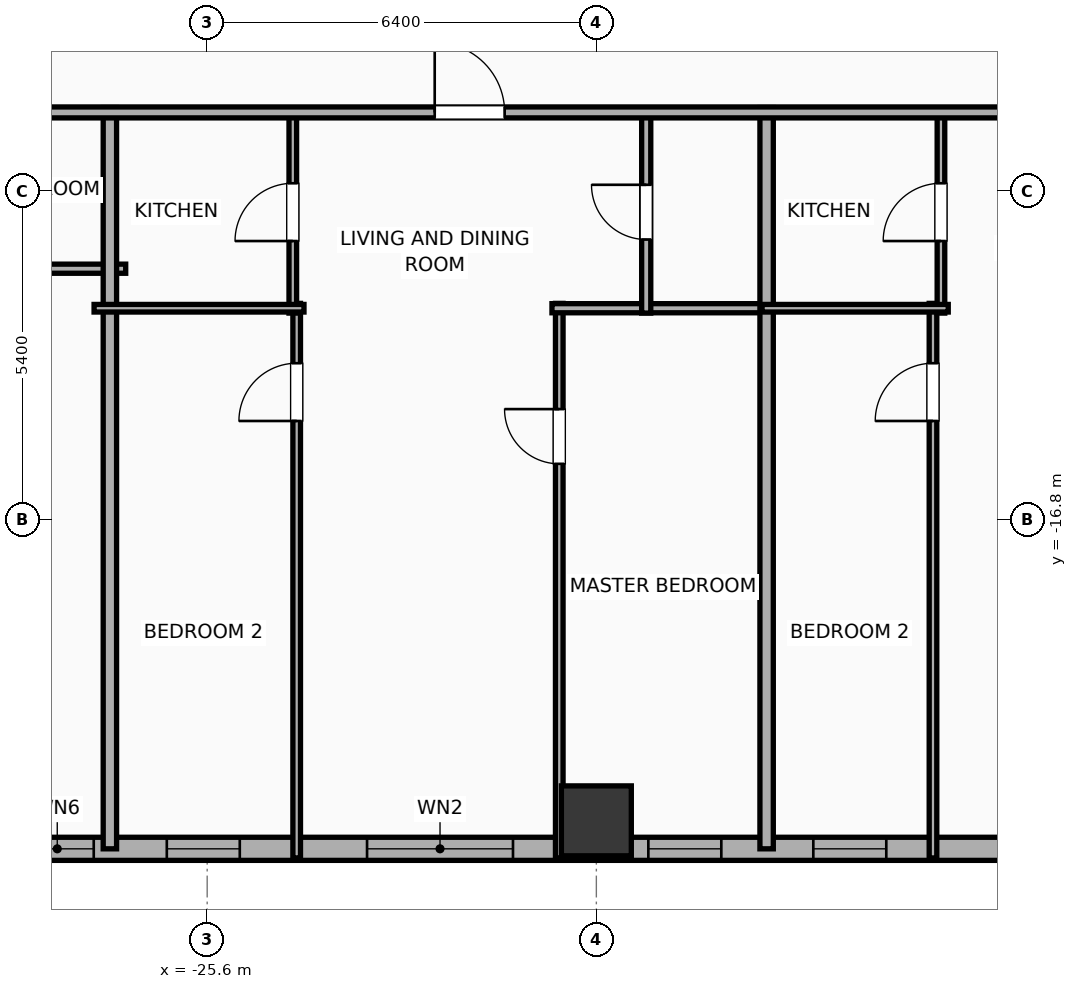
"""IFC4 building model, lengths in metres.
Left out: names, types, materials, properties, quantities, classifications, styles, units other than length and angle.
Written with IfcOpenShell. Run it as: python <this file> out.ifc"""

import sys

from ifc_helpers import new_model, si_unit, direction, frame, frame_2d, origin, origin_2d, place, context, subcontext, project, spatial, rectangle, hollow_rectangle, extrude, element, fill, save


model = new_model("IFC4")
c1 = context("Model", 3, precision=1e-05, world=origin(), true_north=direction((0.0, 1.0)))
c2 = subcontext(c1, "Body", "Model", "MODEL_VIEW")
j1 = project(units=[si_unit("LENGTHUNIT", "METRE"), si_unit("PLANEANGLEUNIT", "RADIAN")], contexts=[c1])
p1 = place(None, origin())
s1 = spatial("IfcSite", under=j1, at=p1, CompositionType="ELEMENT")
p2 = place(p1, origin())
s2 = spatial("IfcBuilding", under=s1, at=p2, CompositionType="ELEMENT")
p3 = place(p2, frame((0.0, 0.0, 37.7)))
s3 = spatial("IfcBuildingStorey", under=s2, at=p3, CompositionType="ELEMENT", Elevation=37.7)
p4 = place(p3, frame((-19.2, -21.75, 0.0), z_axis=(0.0, 0.0, 1.0), x_axis=(1.0, 0.0, 0.0)))
e1 = element("IfcColumn", 1, at=p4, inside=s3, PredefinedType="COLUMN", context=c2, shape_type="SweptSolid", body=[
    extrude(hollow_rectangle(XDim=1.15, YDim=1.15, WallThickness=0.04, at=origin_2d()), origin(), (0.0, 0.0, 1.0), 3.9),
])
p5 = place(p3, frame((22.381, -22.21, 0.0), z_axis=(0.0, 0.0, 1.0), x_axis=(-1.0, 0.0, 0.0)))
e2 = element("IfcWall", 2, at=p5, inside=s3, PredefinedType="ELEMENTEDWALL", context=c2, shape_type="SweptSolid", body=[
    extrude(rectangle(XDim=51.963, YDim=0.38, at=frame_2d((25.981, 0.0))), origin(), (0.0, 0.0, 1.0), 3.65),
])
p6 = place(p5, frame((42.952, 0.0, 0.75)))
e3 = element("IfcOpeningElement", 3, at=p6, cuts=e2, PredefinedType="OPENING", context=c2, shape_type="SweptSolid", body=[
    extrude(rectangle(XDim=2.4, YDim=2.1, at=frame_2d((1.2, 1.05))), frame((0.0, 0.2, 0.0), z_axis=(0.0, -1.0, 0.0), x_axis=(1.0, 0.0, 0.0)), (0.0, 0.0, 1.0), 0.4),
])
p7 = place(p5, frame((49.847, 0.0, 0.75)))
e4 = element("IfcOpeningElement", 4, at=p7, cuts=e2, PredefinedType="OPENING", context=c2, shape_type="SweptSolid", body=[
    extrude(rectangle(XDim=1.2, YDim=2.05, at=frame_2d((0.6, 1.025))), frame((0.0, 0.2, 0.0), z_axis=(0.0, -1.0, 0.0), x_axis=(1.0, 0.0, 0.0)), (0.0, 0.0, 1.0), 0.4),
])
p8 = place(p5, frame((47.445, 0.0, 0.75)))
e5 = element("IfcOpeningElement", 5, at=p8, cuts=e2, PredefinedType="OPENING", context=c2, shape_type="SweptSolid", body=[
    extrude(rectangle(XDim=1.2, YDim=2.05, at=frame_2d((0.6, 1.025))), frame((0.0, 0.2, 0.0), z_axis=(0.0, -1.0, 0.0), x_axis=(1.0, 0.0, 0.0)), (0.0, 0.0, 1.0), 0.4),
])
p9 = place(p5, frame((39.526, 0.0, 0.75)))
e6 = element("IfcOpeningElement", 6, at=p9, cuts=e2, PredefinedType="OPENING", context=c2, shape_type="SweptSolid", body=[
    extrude(rectangle(XDim=1.2, YDim=2.05, at=frame_2d((0.6, 1.025))), frame((0.0, 0.2, 0.0), z_axis=(0.0, -1.0, 0.0), x_axis=(1.0, 0.0, 0.0)), (0.0, 0.0, 1.0), 0.4),
])
p10 = place(p5, frame((33.018, 0.0, 0.75)))
e7 = element("IfcOpeningElement", 7, at=p10, cuts=e2, PredefinedType="OPENING", context=c2, shape_type="SweptSolid", body=[
    extrude(rectangle(XDim=1.2, YDim=2.05, at=frame_2d((0.6, 1.025))), frame((0.0, 0.2, 0.0), z_axis=(0.0, -1.0, 0.0), x_axis=(1.0, 0.0, 0.0)), (0.0, 0.0, 1.0), 0.4),
])
p11 = place(p5, frame((36.813, 0.0, 0.75)))
e8 = element("IfcOpeningElement", 8, at=p11, cuts=e2, PredefinedType="OPENING", context=c2, shape_type="SweptSolid", body=[
    extrude(rectangle(XDim=1.2, YDim=2.05, at=frame_2d((0.6, 1.025))), frame((0.0, 0.2, 0.0), z_axis=(0.0, -1.0, 0.0), x_axis=(1.0, 0.0, 0.0)), (0.0, 0.0, 1.0), 0.4),
])
p12 = place(p5, frame((28.886, 0.0, 0.75)))
e9 = element("IfcOpeningElement", 9, at=p12, cuts=e2, PredefinedType="OPENING", context=c2, shape_type="SweptSolid", body=[
    extrude(rectangle(XDim=1.2, YDim=2.05, at=frame_2d((0.6, 1.025))), frame((0.0, 0.2, 0.0), z_axis=(0.0, -1.0, 0.0), x_axis=(1.0, 0.0, 0.0)), (0.0, 0.0, 1.0), 0.4),
])
p13 = place(p5, frame((23.306, 0.0, 0.75)))
e10 = element("IfcOpeningElement", 10, at=p13, cuts=e2, PredefinedType="OPENING", context=c2, shape_type="SweptSolid", body=[
    extrude(rectangle(XDim=1.2, YDim=2.05, at=frame_2d((0.6, 1.025))), frame((0.0, 0.2, 0.0), z_axis=(0.0, -1.0, 0.0), x_axis=(1.0, 0.0, 0.0)), (0.0, 0.0, 1.0), 0.4),
])
p14 = place(p5, frame((26.056, 0.0, 0.75)))
e11 = element("IfcOpeningElement", 11, at=p14, cuts=e2, PredefinedType="OPENING", context=c2, shape_type="SweptSolid", body=[
    extrude(rectangle(XDim=1.2, YDim=2.05, at=frame_2d((0.6, 1.025))), frame((0.0, 0.2, 0.0), z_axis=(0.0, -1.0, 0.0), x_axis=(1.0, 0.0, 0.0)), (0.0, 0.0, 1.0), 0.4),
])
p15 = place(p5, frame((18.811, 0.0, 0.75)))
e12 = element("IfcOpeningElement", 12, at=p15, cuts=e2, PredefinedType="OPENING", context=c2, shape_type="SweptSolid", body=[
    extrude(rectangle(XDim=1.2, YDim=2.05, at=frame_2d((0.6, 1.025))), frame((0.0, 0.2, 0.0), z_axis=(0.0, -1.0, 0.0), x_axis=(1.0, 0.0, 0.0)), (0.0, 0.0, 1.0), 0.4),
])
p16 = place(p5, frame((14.602, 0.0, 0.75)))
e13 = element("IfcOpeningElement", 13, at=p16, cuts=e2, PredefinedType="OPENING", context=c2, shape_type="SweptSolid", body=[
    extrude(rectangle(XDim=1.2, YDim=2.05, at=frame_2d((0.6, 1.025))), frame((0.0, 0.2, 0.0), z_axis=(0.0, -1.0, 0.0), x_axis=(1.0, 0.0, 0.0)), (0.0, 0.0, 1.0), 0.4),
])
p17 = place(p5, frame((11.852, 0.0, 0.75)))
e14 = element("IfcOpeningElement", 14, at=p17, cuts=e2, PredefinedType="OPENING", context=c2, shape_type="SweptSolid", body=[
    extrude(rectangle(XDim=1.2, YDim=2.05, at=frame_2d((0.6, 1.025))), frame((0.0, 0.2, 0.0), z_axis=(0.0, -1.0, 0.0), x_axis=(1.0, 0.0, 0.0)), (0.0, 0.0, 1.0), 0.4),
])
p18 = place(p5, frame((8.316, 0.0, 0.75)))
e15 = element("IfcOpeningElement", 15, at=p18, cuts=e2, PredefinedType="OPENING", context=c2, shape_type="SweptSolid", body=[
    extrude(rectangle(XDim=1.2, YDim=2.05, at=frame_2d((0.6, 1.025))), frame((0.0, 0.2, 0.0), z_axis=(0.0, -1.0, 0.0), x_axis=(1.0, 0.0, 0.0)), (0.0, 0.0, 1.0), 0.4),
])
p19 = place(p5, frame((6.286, 0.0, 0.75)))
e16 = element("IfcOpeningElement", 16, at=p19, cuts=e2, PredefinedType="OPENING", context=c2, shape_type="SweptSolid", body=[
    extrude(rectangle(XDim=1.2, YDim=2.05, at=frame_2d((0.6, 1.025))), frame((0.0, 0.2, 0.0), z_axis=(0.0, -1.0, 0.0), x_axis=(1.0, 0.0, 0.0)), (0.0, 0.0, 1.0), 0.4),
])
p20 = place(p5, frame((3.737, 0.0, 0.75)))
e17 = element("IfcOpeningElement", 17, at=p20, cuts=e2, PredefinedType="OPENING", context=c2, shape_type="SweptSolid", body=[
    extrude(rectangle(XDim=1.2, YDim=2.05, at=frame_2d((0.6, 1.025))), frame((0.0, 0.2, 0.0), z_axis=(0.0, -1.0, 0.0), x_axis=(1.0, 0.0, 0.0)), (0.0, 0.0, 1.0), 0.4),
])
p21 = place(p5, frame((1.291, 0.0, 0.75)))
e18 = element("IfcOpeningElement", 18, at=p21, cuts=e2, PredefinedType="OPENING", context=c2, shape_type="SweptSolid", body=[
    extrude(rectangle(XDim=1.2, YDim=2.05, at=frame_2d((0.6, 1.025))), frame((0.0, 0.2, 0.0), z_axis=(0.0, -1.0, 0.0), x_axis=(1.0, 0.0, 0.0)), (0.0, 0.0, 1.0), 0.4),
])
p22 = place(p3, frame((-29.414, -12.67, 0.0), z_axis=(0.0, 0.0, 1.0), x_axis=(1.0, 0.0, 0.0)))
e19 = element("IfcWall", 19, at=p22, inside=s3, PredefinedType="PLUMBINGWALL", context=c2, shape_type="SweptSolid", body=[
    extrude(rectangle(XDim=2.474, YDim=0.15, at=frame_2d((1.237, 0.0))), origin(), (0.0, 0.0, 1.0), 3.65),
])
p23 = place(p3, frame((-27.2, -22.21, 0.0), z_axis=(0.0, 0.0, 1.0), x_axis=(0.0, 1.0, 0.0)))
e20 = element("IfcWall", 20, at=p23, inside=s3, PredefinedType="PARTITIONING", context=c2, shape_type="SweptSolid", body=[
    extrude(rectangle(XDim=12.19, YDim=0.22, at=frame_2d((6.095, 0.0))), origin(), (0.0, 0.0, 1.0), 3.65),
])
p24 = place(p3, frame((-24.128, -22.36, 0.0), z_axis=(0.0, 0.0, 1.0), x_axis=(0.0, 1.0, 0.0)))
e21 = element("IfcWall", 21, at=p24, inside=s3, PredefinedType="PARTITIONING", context=c2, shape_type="SweptSolid", body=[
    extrude(rectangle(XDim=9.12, YDim=0.125, at=frame_2d((4.56, 0.0))), origin(), (0.0, 0.0, 1.0), 3.65),
])
p25 = place(p24, frame((7.186, 0.0, 0.0)))
e22 = element("IfcOpeningElement", 22, at=p25, cuts=e21, PredefinedType="OPENING", context=c2, shape_type="SweptSolid", body=[
    extrude(rectangle(XDim=0.95, YDim=2.05, at=frame_2d((0.475, 1.025))), frame((0.0, 0.073, 0.0), z_axis=(0.0, -1.0, 0.0), x_axis=(1.0, 0.0, 0.0)), (0.0, 0.0, 1.0), 0.145),
])
p26 = place(p3, frame((-19.81, -22.36, 0.0), z_axis=(0.0, 0.0, 1.0), x_axis=(0.0, 1.0, 0.0)))
e23 = element("IfcWall", 23, at=p26, inside=s3, PredefinedType="PARTITIONING", context=c2, shape_type="SweptSolid", body=[
    extrude(rectangle(XDim=9.12, YDim=0.125, at=frame_2d((4.56, 0.0))), origin(), (0.0, 0.0, 1.0), 3.65),
])
p27 = place(p26, frame((6.481, 0.0, 0.0)))
e24 = element("IfcOpeningElement", 24, at=p27, cuts=e23, PredefinedType="OPENING", context=c2, shape_type="SweptSolid", body=[
    extrude(rectangle(XDim=0.9, YDim=2.05, at=frame_2d((0.45, 1.025))), frame((0.0, 0.073, 0.0), z_axis=(0.0, -1.0, 0.0), x_axis=(1.0, 0.0, 0.0)), (0.0, 0.0, 1.0), 0.145),
])
p28 = place(p3, frame((-19.93, -13.32, 0.0), z_axis=(0.0, 0.0, 1.0), x_axis=(1.0, 0.0, 0.0)))
e25 = element("IfcWall", 25, at=p28, inside=s3, PredefinedType="PLUMBINGWALL", context=c2, shape_type="SweptSolid", body=[
    extrude(rectangle(XDim=3.605, YDim=0.15, at=frame_2d((1.802, 0.0))), origin(), (0.0, 0.0, 1.0), 3.65),
])
p29 = place(p3, frame((-24.192, -13.4, 0.0), z_axis=(0.0, 0.0, 1.0), x_axis=(0.0, 1.0, 0.0)))
e26 = element("IfcWall", 26, at=p29, inside=s3, PredefinedType="PARTITIONING", context=c2, shape_type="SweptSolid", body=[
    extrude(rectangle(XDim=3.32, YDim=0.125, at=frame_2d((1.66, 0.0))), origin(), (0.0, 0.0, 1.0), 3.65),
])
p30 = place(p29, frame((1.185, 0.0, 0.0)))
e27 = element("IfcOpeningElement", 27, at=p30, cuts=e26, PredefinedType="OPENING", context=c2, shape_type="SweptSolid", body=[
    extrude(rectangle(XDim=0.95, YDim=2.05, at=frame_2d((0.475, 1.025))), frame((0.0, 0.073, 0.0), z_axis=(0.0, -1.0, 0.0), x_axis=(1.0, 0.0, 0.0)), (0.0, 0.0, 1.0), 0.145),
])
p31 = place(p3, frame((-27.46, -13.32, 0.0), z_axis=(0.0, 0.0, 1.0), x_axis=(1.0, 0.0, 0.0)))
e28 = element("IfcWall", 28, at=p31, inside=s3, PredefinedType="PARTITIONING", context=c2, shape_type="SweptSolid", body=[
    extrude(rectangle(XDim=3.452, YDim=0.125, at=frame_2d((1.726, 0.0))), origin(), (0.0, 0.0, 1.0), 3.65),
])
p32 = place(p3, frame((-18.38, -13.4, 0.0), z_axis=(0.0, 0.0, 1.0), x_axis=(0.0, 1.0, 0.0)))
e29 = element("IfcWall", 29, at=p32, inside=s3, PredefinedType="PLUMBINGWALL", context=c2, shape_type="SweptSolid", body=[
    extrude(rectangle(XDim=3.32, YDim=0.15, at=frame_2d((1.66, 0.0))), origin(), (0.0, 0.0, 1.0), 3.65),
])
p33 = place(p32, frame((1.21, 0.0, 0.0)))
e30 = element("IfcOpeningElement", 30, at=p33, cuts=e29, PredefinedType="OPENING", context=c2, shape_type="SweptSolid", body=[
    extrude(rectangle(XDim=0.9, YDim=2.05, at=frame_2d((0.45, 1.025))), frame((0.0, 0.085, 0.0), z_axis=(0.0, -1.0, 0.0), x_axis=(1.0, 0.0, 0.0)), (0.0, 0.0, 1.0), 0.17),
])
p34 = place(p3, frame((-16.4, -22.21, 0.0), z_axis=(0.0, 0.0, 1.0), x_axis=(0.0, 1.0, 0.0)))
e31 = element("IfcWall", 31, at=p34, inside=s3, PredefinedType="PARTITIONING", context=c2, shape_type="SweptSolid", body=[
    extrude(rectangle(XDim=12.19, YDim=0.22, at=frame_2d((6.095, 0.0))), origin(), (0.0, 0.0, 1.0), 3.65),
])
p35 = place(p3, frame((-13.664, -22.36, 0.0), z_axis=(0.0, 0.0, 1.0), x_axis=(0.0, 1.0, 0.0)))
e32 = element("IfcWall", 32, at=p35, inside=s3, PredefinedType="PARTITIONING", context=c2, shape_type="SweptSolid", body=[
    extrude(rectangle(XDim=9.12, YDim=0.125, at=frame_2d((4.56, 0.0))), origin(), (0.0, 0.0, 1.0), 3.65),
])
p36 = place(p35, frame((7.186, 0.0, 0.0)))
e33 = element("IfcOpeningElement", 33, at=p36, cuts=e32, PredefinedType="OPENING", context=c2, shape_type="SweptSolid", body=[
    extrude(rectangle(XDim=0.95, YDim=2.05, at=frame_2d((0.475, 1.025))), frame((0.0, 0.073, 0.0), z_axis=(0.0, -1.0, 0.0), x_axis=(1.0, 0.0, 0.0)), (0.0, 0.0, 1.0), 0.145),
])
p37 = place(p3, frame((-13.533, -13.4, 0.0), z_axis=(0.0, 0.0, 1.0), x_axis=(0.0, 1.0, 0.0)))
e34 = element("IfcWall", 34, at=p37, inside=s3, PredefinedType="PARTITIONING", context=c2, shape_type="SweptSolid", body=[
    extrude(rectangle(XDim=3.32, YDim=0.125, at=frame_2d((1.66, 0.0))), origin(), (0.0, 0.0, 1.0), 3.65),
])
p38 = place(p37, frame((1.185, 0.0, 0.0)))
e35 = element("IfcOpeningElement", 35, at=p38, cuts=e34, PredefinedType="OPENING", context=c2, shape_type="SweptSolid", body=[
    extrude(rectangle(XDim=0.95, YDim=2.05, at=frame_2d((0.475, 1.025))), frame((0.0, 0.073, 0.0), z_axis=(0.0, -1.0, 0.0), x_axis=(1.0, 0.0, 0.0)), (0.0, 0.0, 1.0), 0.145),
])
p39 = place(p3, frame((-16.475, -13.32, 0.0), z_axis=(0.0, 0.0, 1.0), x_axis=(1.0, 0.0, 0.0)))
e36 = element("IfcWall", 36, at=p39, inside=s3, PredefinedType="PARTITIONING", context=c2, shape_type="SweptSolid", body=[
    extrude(rectangle(XDim=3.062, YDim=0.125, at=frame_2d((1.531, 0.0))), origin(), (0.0, 0.0, 1.0), 3.65),
])
p40 = place(p3, frame((-33.41, -10.1, 0.0), z_axis=(0.0, 0.0, 1.0), x_axis=(1.0, 0.0, 0.0)))
e37 = element("IfcWall", 37, at=p40, inside=s3, PredefinedType="PARTITIONING", context=c2, shape_type="SweptSolid", body=[
    extrude(rectangle(XDim=59.62, YDim=0.18, at=frame_2d((29.81, 0.0))), origin(), (0.0, 0.0, 1.0), 3.65),
])
p41 = place(p40, frame((2.746, 0.0, 0.0)))
e38 = element("IfcOpeningElement", 38, at=p41, cuts=e37, PredefinedType="OPENING", context=c2, shape_type="SweptSolid", body=[
    extrude(rectangle(XDim=0.9, YDim=2.05, at=frame_2d((0.45, 1.025))), frame((0.0, 0.1, 0.0), z_axis=(0.0, -1.0, 0.0), x_axis=(1.0, 0.0, 0.0)), (0.0, 0.0, 1.0), 0.2),
])
p42 = place(p40, frame((11.552, 0.0, 0.0)))
e39 = element("IfcOpeningElement", 39, at=p42, cuts=e37, PredefinedType="OPENING", context=c2, shape_type="SweptSolid", body=[
    extrude(rectangle(XDim=1.15, YDim=2.05, at=frame_2d((0.575, 1.025))), frame((0.0, 0.1, 0.0), z_axis=(0.0, -1.0, 0.0), x_axis=(1.0, 0.0, 0.0)), (0.0, 0.0, 1.0), 0.2),
])
p43 = place(p40, frame((22.379, 0.0, 0.0)))
e40 = element("IfcOpeningElement", 40, at=p43, cuts=e37, PredefinedType="OPENING", context=c2, shape_type="SweptSolid", body=[
    extrude(rectangle(XDim=1.15, YDim=2.05, at=frame_2d((0.575, 1.025))), frame((0.0, 0.1, 0.0), z_axis=(0.0, -1.0, 0.0), x_axis=(1.0, 0.0, 0.0)), (0.0, 0.0, 1.0), 0.2),
])
p44 = place(p40, frame((31.28, 0.0, 0.0)))
e41 = element("IfcOpeningElement", 41, at=p44, cuts=e37, PredefinedType="OPENING", context=c2, shape_type="SweptSolid", body=[
    extrude(rectangle(XDim=1.15, YDim=2.05, at=frame_2d((0.575, 1.025))), frame((0.0, 0.1, 0.0), z_axis=(0.0, -1.0, 0.0), x_axis=(1.0, 0.0, 0.0)), (0.0, 0.0, 1.0), 0.2),
])
p45 = place(p40, frame((36.02, 0.0, 0.0)))
e42 = element("IfcOpeningElement", 42, at=p45, cuts=e37, PredefinedType="OPENING", context=c2, shape_type="SweptSolid", body=[
    extrude(rectangle(XDim=0.9, YDim=2.05, at=frame_2d((0.45, 1.025))), frame((0.0, 0.1, 0.0), z_axis=(0.0, -1.0, 0.0), x_axis=(1.0, 0.0, 0.0)), (0.0, 0.0, 1.0), 0.2),
])
p46 = place(p40, frame((40.044, 0.0, 0.0)))
e43 = element("IfcOpeningElement", 43, at=p46, cuts=e37, PredefinedType="OPENING", context=c2, shape_type="SweptSolid", body=[
    extrude(rectangle(XDim=1.15, YDim=2.05, at=frame_2d((0.575, 1.025))), frame((0.0, 0.1, 0.0), z_axis=(0.0, -1.0, 0.0), x_axis=(1.0, 0.0, 0.0)), (0.0, 0.0, 1.0), 0.2),
])
p47 = place(p40, frame((45.613, 0.0, 0.0)))
e44 = element("IfcOpeningElement", 44, at=p47, cuts=e37, PredefinedType="OPENING", context=c2, shape_type="SweptSolid", body=[
    extrude(rectangle(XDim=1.15, YDim=2.05, at=frame_2d((0.575, 1.025))), frame((0.0, 0.1, 0.0), z_axis=(0.0, -1.0, 0.0), x_axis=(1.0, 0.0, 0.0)), (0.0, 0.0, 1.0), 0.2),
])
p48 = place(p40, frame((54.174, 0.0, 0.0)))
e45 = element("IfcOpeningElement", 45, at=p48, cuts=e37, PredefinedType="OPENING", context=c2, shape_type="SweptSolid", body=[
    extrude(rectangle(XDim=1.15, YDim=2.05, at=frame_2d((0.575, 1.025))), frame((0.0, 0.1, 0.0), z_axis=(0.0, -1.0, 0.0), x_axis=(1.0, 0.0, 0.0)), (0.0, 0.0, 1.0), 0.2),
])
p49 = place(p6, origin())
e46 = element("IfcWindow", 46, at=p49, inside=s3, PartitioningType="SINGLE_PANEL", PredefinedType="WINDOW", context=c2, shape_type="SweptSolid", body=[
    extrude(rectangle(XDim=2.4, YDim=2.1, at=frame_2d((1.2, 1.05))), frame((0.0, 0.03, 0.0), z_axis=(0.0, -1.0, 0.0), x_axis=(1.0, 0.0, 0.0)), (0.0, 0.0, 1.0), 0.06),
])
fill(e3, e46)
p50 = place(p7, origin())
e47 = element("IfcWindow", 47, at=p50, inside=s3, PartitioningType="SINGLE_PANEL", PredefinedType="WINDOW", context=c2, shape_type="SweptSolid", body=[
    extrude(rectangle(XDim=1.2, YDim=2.05, at=frame_2d((0.6, 1.025))), frame((0.0, 0.03, 0.0), z_axis=(0.0, -1.0, 0.0), x_axis=(1.0, 0.0, 0.0)), (0.0, 0.0, 1.0), 0.06),
])
fill(e4, e47)
p51 = place(p8, origin())
e48 = element("IfcWindow", 48, at=p51, inside=s3, PartitioningType="SINGLE_PANEL", PredefinedType="WINDOW", context=c2, shape_type="SweptSolid", body=[
    extrude(rectangle(XDim=1.2, YDim=2.05, at=frame_2d((0.6, 1.025))), frame((0.0, 0.03, 0.0), z_axis=(0.0, -1.0, 0.0), x_axis=(1.0, 0.0, 0.0)), (0.0, 0.0, 1.0), 0.06),
])
fill(e5, e48)
p52 = place(p9, origin())
e49 = element("IfcWindow", 49, at=p52, inside=s3, PartitioningType="SINGLE_PANEL", PredefinedType="WINDOW", context=c2, shape_type="SweptSolid", body=[
    extrude(rectangle(XDim=1.2, YDim=2.05, at=frame_2d((0.6, 1.025))), frame((0.0, 0.03, 0.0), z_axis=(0.0, -1.0, 0.0), x_axis=(1.0, 0.0, 0.0)), (0.0, 0.0, 1.0), 0.06),
])
fill(e6, e49)
p53 = place(p11, origin())
e50 = element("IfcWindow", 50, at=p53, inside=s3, PartitioningType="SINGLE_PANEL", PredefinedType="WINDOW", context=c2, shape_type="SweptSolid", body=[
    extrude(rectangle(XDim=1.2, YDim=2.05, at=frame_2d((0.6, 1.025))), frame((0.0, 0.03, 0.0), z_axis=(0.0, -1.0, 0.0), x_axis=(1.0, 0.0, 0.0)), (0.0, 0.0, 1.0), 0.06),
])
fill(e8, e50)
p54 = place(p25, origin())
e51 = element("IfcDoor", 51, at=p54, inside=s3, OperationType="SINGLE_SWING_LEFT", PredefinedType="DOOR", context=c2, shape_type="SweptSolid", body=[
    extrude(rectangle(XDim=0.95, YDim=2.05, at=frame_2d((0.475, 1.025))), frame((0.0, 0.025, 0.0), z_axis=(0.0, -1.0, 0.0), x_axis=(1.0, 0.0, 0.0)), (0.0, 0.0, 1.0), 0.05),
])
fill(e22, e51)
p55 = place(p27, origin())
e52 = element("IfcDoor", 52, at=p55, inside=s3, OperationType="SINGLE_SWING_RIGHT", PredefinedType="DOOR", context=c2, shape_type="SweptSolid", body=[
    extrude(rectangle(XDim=0.9, YDim=2.05, at=frame_2d((0.45, 1.025))), frame((0.0, 0.025, 0.0), z_axis=(0.0, -1.0, 0.0), x_axis=(1.0, 0.0, 0.0)), (0.0, 0.0, 1.0), 0.05),
])
fill(e24, e52)
p56 = place(p30, origin())
e53 = element("IfcDoor", 53, at=p56, inside=s3, OperationType="SINGLE_SWING_LEFT", PredefinedType="DOOR", context=c2, shape_type="SweptSolid", body=[
    extrude(rectangle(XDim=0.95, YDim=2.05, at=frame_2d((0.475, 1.025))), frame((0.0, 0.025, 0.0), z_axis=(0.0, -1.0, 0.0), x_axis=(1.0, 0.0, 0.0)), (0.0, 0.0, 1.0), 0.05),
])
fill(e27, e53)
p57 = place(p33, origin())
e54 = element("IfcDoor", 54, at=p57, inside=s3, OperationType="SINGLE_SWING_RIGHT", PredefinedType="DOOR", context=c2, shape_type="SweptSolid", body=[
    extrude(rectangle(XDim=0.9, YDim=2.05, at=frame_2d((0.45, 1.025))), frame((0.0, 0.025, 0.0), z_axis=(0.0, -1.0, 0.0), x_axis=(1.0, 0.0, 0.0)), (0.0, 0.0, 1.0), 0.05),
])
fill(e30, e54)
p58 = place(p36, origin())
e55 = element("IfcDoor", 55, at=p58, inside=s3, OperationType="SINGLE_SWING_LEFT", PredefinedType="DOOR", context=c2, shape_type="SweptSolid", body=[
    extrude(rectangle(XDim=0.95, YDim=2.05, at=frame_2d((0.475, 1.025))), frame((0.0, 0.025, 0.0), z_axis=(0.0, -1.0, 0.0), x_axis=(1.0, 0.0, 0.0)), (0.0, 0.0, 1.0), 0.05),
])
fill(e33, e55)
p59 = place(p38, origin())
e56 = element("IfcDoor", 56, at=p59, inside=s3, OperationType="SINGLE_SWING_LEFT", PredefinedType="DOOR", context=c2, shape_type="SweptSolid", body=[
    extrude(rectangle(XDim=0.95, YDim=2.05, at=frame_2d((0.475, 1.025))), frame((0.0, 0.025, 0.0), z_axis=(0.0, -1.0, 0.0), x_axis=(1.0, 0.0, 0.0)), (0.0, 0.0, 1.0), 0.05),
])
fill(e35, e56)
p60 = place(p42, origin())
e57 = element("IfcDoor", 57, at=p60, inside=s3, OperationType="SINGLE_SWING_LEFT", PredefinedType="DOOR", context=c2, shape_type="SweptSolid", body=[
    extrude(rectangle(XDim=1.15, YDim=2.05, at=frame_2d((0.575, 1.025))), frame((0.0, 0.025, 0.0), z_axis=(0.0, -1.0, 0.0), x_axis=(1.0, 0.0, 0.0)), (0.0, 0.0, 1.0), 0.05),
])
fill(e39, e57)
save(model, sys.argv[1])
